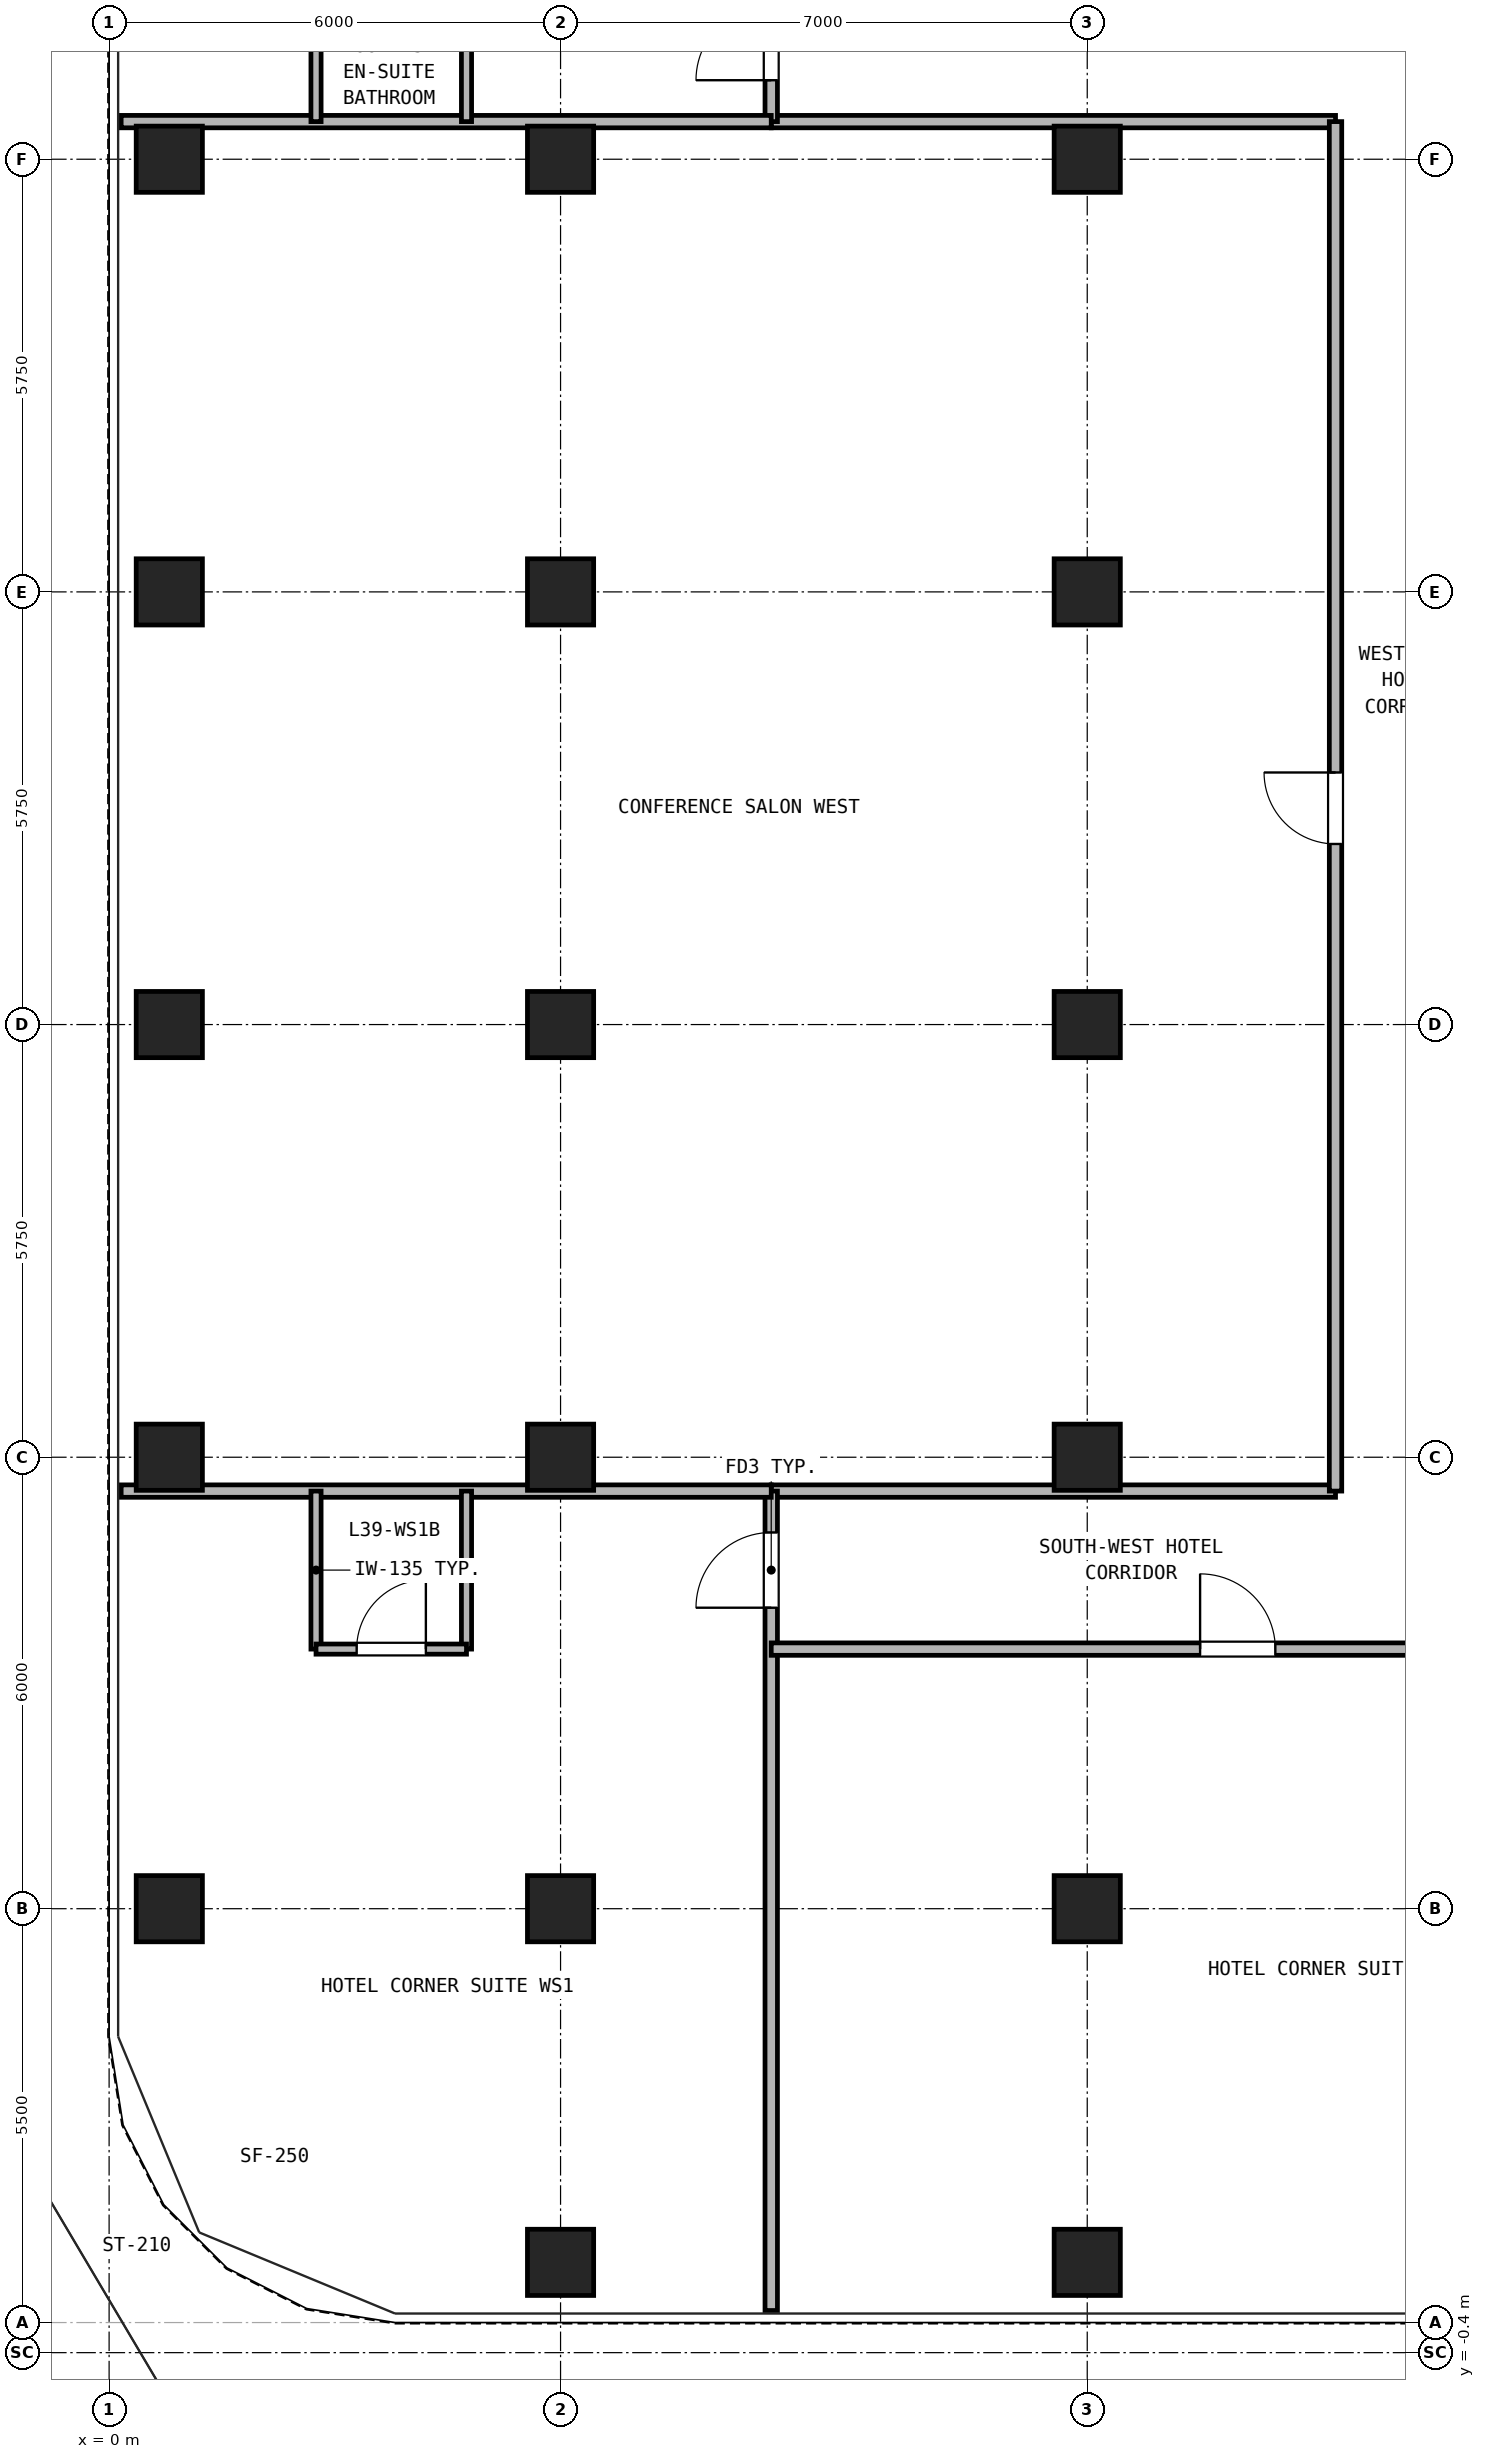
"""IFC4 building model, lengths in metres.
Left out: names, types, materials, properties, quantities, classifications, styles, units other than length and angle.
Written with IfcOpenShell. Run it as: python <this file> out.ifc"""

import sys

from ifc_helpers import new_model, si_unit, direction, frame, frame_2d, origin, origin_2d, place, context, subcontext, project, spatial, rectangle, hollow_rectangle, extrude, source, transform, mapped, element, fill, save


model = new_model("IFC4")
c1 = context("Model", 3, precision=1e-05, world=origin(), true_north=direction((0.0, 1.0)))
c2 = subcontext(c1, "Body", "Model", "MODEL_VIEW")
j1 = project(units=[si_unit("LENGTHUNIT", "METRE"), si_unit("PLANEANGLEUNIT", "RADIAN")], contexts=[c1])
p1 = place(None, origin())
s1 = spatial("IfcSite", under=j1, at=p1, CompositionType="ELEMENT")
p2 = place(p1, origin())
s2 = spatial("IfcBuilding", under=s1, at=p2, CompositionType="ELEMENT")
p3 = place(p2, frame((0.0, 0.0, 140.7)))
s3 = spatial("IfcBuildingStorey", under=s2, at=p3, CompositionType="ELEMENT", Elevation=140.7)
m1 = source(origin(), c2, "Body", "SweptSolid", [
    extrude(hollow_rectangle(XDim=0.88, YDim=0.88, WallThickness=0.05, at=origin_2d()), origin(), (0.0, 0.0, 1.0), 2.84),
])
for number, where, z_axis, x_axis in (
    (1, (6.0, 0.8, 0.0), (0.0, 0.0, 1.0), (1.0, 0.0, 0.0)),
    (2, (13.0, 0.8, 0.0), (0.0, 0.0, 1.0), (1.0, 0.0, 0.0)),
    (3, (0.8, 5.5, 0.0), (0.0, 0.0, 1.0), (1.0, 0.0, 0.0)),
    (4, (0.8, 11.5, 0.0), (0.0, 0.0, 1.0), (1.0, 0.0, 0.0)),
    (5, (0.8, 17.25, 0.0), (0.0, 0.0, 1.0), (1.0, 0.0, 0.0)),
    (6, (0.8, 23.0, 0.0), (0.0, 0.0, 1.0), (1.0, 0.0, 0.0)),
    (7, (0.8, 28.75, 0.0), (0.0, 0.0, 1.0), (1.0, 0.0, 0.0)),
    (8, (6.0, 5.5, 0.0), (0.0, 0.0, 1.0), (1.0, 0.0, 0.0)),
    (9, (6.0, 11.5, 0.0), (0.0, 0.0, 1.0), (1.0, 0.0, 0.0)),
    (10, (6.0, 17.25, 0.0), (0.0, 0.0, 1.0), (1.0, 0.0, 0.0)),
    (11, (6.0, 23.0, 0.0), (0.0, 0.0, 1.0), (1.0, 0.0, 0.0)),
    (12, (6.0, 28.75, 0.0), (0.0, 0.0, 1.0), (1.0, 0.0, 0.0)),
    (13, (13.0, 5.5, 0.0), (0.0, 0.0, 1.0), (1.0, 0.0, 0.0)),
    (14, (13.0, 11.5, 0.0), (0.0, 0.0, 1.0), (1.0, 0.0, 0.0)),
    (15, (13.0, 17.25, 0.0), (0.0, 0.0, 1.0), (1.0, 0.0, 0.0)),
    (16, (13.0, 23.0, 0.0), (0.0, 0.0, 1.0), (1.0, 0.0, 0.0)),
    (17, (13.0, 28.75, 0.0), (0.0, 0.0, 1.0), (1.0, 0.0, 0.0)),
):
    element("IfcColumn", number, at=place(p3, frame(where, z_axis=z_axis, x_axis=x_axis)), inside=s3, PredefinedType="COLUMN", context=c2, shape_type="MappedRepresentation", body=[
        mapped(m1, transform((0.0, 0.0, 0.0), x_axis=(1.0, 0.0, 0.0), y_axis=(0.0, 1.0, 0.0), z_axis=(0.0, 0.0, 1.0), scale=1.0)),
    ])
for number, where, z_axis, x_axis in (
    (18, (8.8, 11.05, 0.0), (0.0, 0.0, 1.0), (1.0, 0.0, 0.0)),
    (19, (8.8, 29.25, 0.0), (0.0, 0.0, 1.0), (1.0, 0.0, 0.0)),
):
    element("IfcWall", number, at=place(p3, frame(where, z_axis=z_axis, x_axis=x_axis)), inside=s3, PredefinedType="PARTITIONING", context=c2, shape_type="SweptSolid", body=[
        extrude(rectangle(XDim=7.5, YDim=0.165, at=frame_2d((3.75, 0.0))), origin(), (0.0, 0.0, 1.0), 2.84),
    ])
p4 = place(p3, frame((16.3, 11.05, 0.0), z_axis=(0.0, 0.0, 1.0), x_axis=(0.0, 1.0, 0.0)))
e20 = element("IfcWall", 20, at=p4, inside=s3, PredefinedType="PARTITIONING", context=c2, shape_type="SweptSolid", body=[
    extrude(rectangle(XDim=18.2, YDim=0.165, at=frame_2d((9.1, 0.0))), origin(), (0.0, 0.0, 1.0), 2.84),
])
p5 = place(p4, frame((8.6, 0.0, 0.0)))
e21 = element("IfcOpeningElement", 21, at=p5, cuts=e20, PredefinedType="OPENING", context=c2, shape_type="SweptSolid", body=[
    extrude(rectangle(XDim=0.95, YDim=2.15, at=frame_2d((0.475, 1.075))), frame((0.0, 0.093, 0.0), z_axis=(0.0, -1.0, 0.0), x_axis=(1.0, 0.0, 0.0)), (0.0, 0.0, 1.0), 0.185),
])
p6 = place(p3, frame((8.8, 0.16, 0.0), z_axis=(0.0, 0.0, 1.0), x_axis=(0.0, 1.0, 0.0)))
e22 = element("IfcWall", 22, at=p6, inside=s3, PredefinedType="PARTITIONING", context=c2, shape_type="SweptSolid", body=[
    extrude(rectangle(XDim=10.89, YDim=0.165, at=frame_2d((5.445, 0.0))), origin(), (0.0, 0.0, 1.0), 2.84),
])
p7 = place(p6, frame((9.34, 0.0, 0.0)))
e23 = element("IfcOpeningElement", 23, at=p7, cuts=e22, PredefinedType="OPENING", context=c2, shape_type="SweptSolid", body=[
    extrude(rectangle(XDim=1.0, YDim=2.15, at=frame_2d((0.5, 1.075))), frame((0.0, 0.093, 0.0), z_axis=(0.0, -1.0, 0.0), x_axis=(1.0, 0.0, 0.0)), (0.0, 0.0, 1.0), 0.185),
])
p8 = place(p3, frame((8.8, 29.25, 0.0), z_axis=(0.0, 0.0, 1.0), x_axis=(0.0, 1.0, 0.0)))
e24 = element("IfcWall", 24, at=p8, inside=s3, PredefinedType="PARTITIONING", context=c2, shape_type="SweptSolid", body=[
    extrude(rectangle(XDim=5.89, YDim=0.165, at=frame_2d((2.945, 0.0))), origin(), (0.0, 0.0, 1.0), 2.84),
])
p9 = place(p8, frame((0.55, 0.0, 0.0)))
e25 = element("IfcOpeningElement", 25, at=p9, cuts=e24, PredefinedType="OPENING", context=c2, shape_type="SweptSolid", body=[
    extrude(rectangle(XDim=1.0, YDim=2.15, at=frame_2d((0.5, 1.075))), frame((0.0, 0.093, 0.0), z_axis=(0.0, -1.0, 0.0), x_axis=(1.0, 0.0, 0.0)), (0.0, 0.0, 1.0), 0.185),
])
for number, where, z_axis, x_axis in (
    (26, (0.16, 11.05, 0.0), (0.0, 0.0, 1.0), (1.0, 0.0, 0.0)),
    (27, (0.16, 29.25, 0.0), (0.0, 0.0, 1.0), (1.0, 0.0, 0.0)),
):
    element("IfcWall", number, at=place(p3, frame(where, z_axis=z_axis, x_axis=x_axis)), inside=s3, PredefinedType="PARTITIONING", context=c2, shape_type="SweptSolid", body=[
        extrude(rectangle(XDim=8.64, YDim=0.165, at=frame_2d((4.32, 0.0))), origin(), (0.0, 0.0, 1.0), 2.84),
    ])
for number, where, z_axis, x_axis in (
    (28, (2.75, 8.95, 0.0), (0.0, 0.0, 1.0), (0.0, 1.0, 0.0)),
    (29, (4.75, 8.95, 0.0), (0.0, 0.0, 1.0), (0.0, 1.0, 0.0)),
):
    element("IfcWall", number, at=place(p3, frame(where, z_axis=z_axis, x_axis=x_axis)), inside=s3, PredefinedType="PARTITIONING", context=c2, shape_type="SweptSolid", body=[
        extrude(rectangle(XDim=2.1, YDim=0.135, at=frame_2d((1.05, 0.0))), origin(), (0.0, 0.0, 1.0), 2.84),
    ])
p10 = place(p3, frame((2.75, 8.95, 0.0), z_axis=(0.0, 0.0, 1.0), x_axis=(1.0, 0.0, 0.0)))
e30 = element("IfcWall", 30, at=p10, inside=s3, PredefinedType="PARTITIONING", context=c2, shape_type="SweptSolid", body=[
    extrude(rectangle(XDim=2.0, YDim=0.135, at=frame_2d((1.0, 0.0))), origin(), (0.0, 0.0, 1.0), 2.84),
])
p11 = place(p10, frame((0.54, 0.0, 0.0)))
e31 = element("IfcOpeningElement", 31, at=p11, cuts=e30, PredefinedType="OPENING", context=c2, shape_type="SweptSolid", body=[
    extrude(rectangle(XDim=0.92, YDim=2.1, at=frame_2d((0.46, 1.05))), frame((0.0, 0.077, 0.0), z_axis=(0.0, -1.0, 0.0), x_axis=(1.0, 0.0, 0.0)), (0.0, 0.0, 1.0), 0.155),
])
for number, where, z_axis, x_axis in (
    (32, (2.75, 29.25, 0.0), (0.0, 0.0, 1.0), (0.0, 1.0, 0.0)),
    (33, (4.75, 29.25, 0.0), (0.0, 0.0, 1.0), (0.0, 1.0, 0.0)),
):
    element("IfcWall", number, at=place(p3, frame(where, z_axis=z_axis, x_axis=x_axis)), inside=s3, PredefinedType="PARTITIONING", context=c2, shape_type="SweptSolid", body=[
        extrude(rectangle(XDim=2.1, YDim=0.135, at=frame_2d((1.05, 0.0))), origin(), (0.0, 0.0, 1.0), 2.84),
    ])
p12 = place(p3, frame((8.8, 8.95, 0.0), z_axis=(0.0, 0.0, 1.0), x_axis=(1.0, 0.0, 0.0)))
e34 = element("IfcWall", 34, at=p12, inside=s3, PredefinedType="PARTITIONING", context=c2, shape_type="SweptSolid", body=[
    extrude(rectangle(XDim=12.4, YDim=0.165, at=frame_2d((6.2, 0.0))), origin(), (0.0, 0.0, 1.0), 2.84),
])
p13 = place(p12, frame((5.7, 0.0, 0.0)))
e35 = element("IfcOpeningElement", 35, at=p13, cuts=e34, PredefinedType="OPENING", context=c2, shape_type="SweptSolid", body=[
    extrude(rectangle(XDim=1.0, YDim=2.15, at=frame_2d((0.5, 1.075))), frame((0.0, 0.093, 0.0), z_axis=(0.0, -1.0, 0.0), x_axis=(1.0, 0.0, 0.0)), (0.0, 0.0, 1.0), 0.185),
])
p14 = place(p11, origin())
e36 = element("IfcDoor", 36, at=p14, inside=s3, OperationType="SINGLE_SWING_RIGHT", PredefinedType="DOOR", context=c2, shape_type="SweptSolid", body=[
    extrude(rectangle(XDim=0.92, YDim=2.1, at=frame_2d((0.46, 1.05))), frame((0.0, 0.025, 0.0), z_axis=(0.0, -1.0, 0.0), x_axis=(1.0, 0.0, 0.0)), (0.0, 0.0, 1.0), 0.05),
])
fill(e31, e36)
p15 = place(p7, origin())
e37 = element("IfcDoor", 37, at=p15, inside=s3, OperationType="SINGLE_SWING_LEFT", PredefinedType="DOOR", context=c2, shape_type="SweptSolid", body=[
    extrude(rectangle(XDim=1.0, YDim=2.15, at=frame_2d((0.5, 1.075))), frame((0.0, 0.025, 0.0), z_axis=(0.0, -1.0, 0.0), x_axis=(1.0, 0.0, 0.0)), (0.0, 0.0, 1.0), 0.05),
])
fill(e23, e37)
p16 = place(p9, origin())
e38 = element("IfcDoor", 38, at=p16, inside=s3, OperationType="SINGLE_SWING_LEFT", PredefinedType="DOOR", context=c2, shape_type="SweptSolid", body=[
    extrude(rectangle(XDim=1.0, YDim=2.15, at=frame_2d((0.5, 1.075))), frame((0.0, 0.025, 0.0), z_axis=(0.0, -1.0, 0.0), x_axis=(1.0, 0.0, 0.0)), (0.0, 0.0, 1.0), 0.05),
])
fill(e25, e38)
p17 = place(p13, frame((1.0, 0.0, 0.0), z_axis=(0.0, 0.0, 1.0), x_axis=(-1.0, 0.0, 0.0)))
e39 = element("IfcDoor", 39, at=p17, inside=s3, OperationType="SINGLE_SWING_LEFT", PredefinedType="DOOR", context=c2, shape_type="SweptSolid", body=[
    extrude(rectangle(XDim=1.0, YDim=2.15, at=frame_2d((0.5, 1.075))), frame((0.0, 0.025, 0.0), z_axis=(0.0, -1.0, 0.0), x_axis=(1.0, 0.0, 0.0)), (0.0, 0.0, 1.0), 0.05),
])
fill(e35, e39)
p18 = place(p5, frame((0.95, 0.0, 0.0), z_axis=(0.0, 0.0, 1.0), x_axis=(-1.0, 0.0, 0.0)))
e40 = element("IfcDoor", 40, at=p18, inside=s3, OperationType="SINGLE_SWING_RIGHT", PredefinedType="DOOR", context=c2, shape_type="SweptSolid", body=[
    extrude(rectangle(XDim=0.95, YDim=2.15, at=frame_2d((0.475, 1.075))), frame((0.0, 0.025, 0.0), z_axis=(0.0, -1.0, 0.0), x_axis=(1.0, 0.0, 0.0)), (0.0, 0.0, 1.0), 0.05),
])
fill(e21, e40)
save(model, sys.argv[1])
